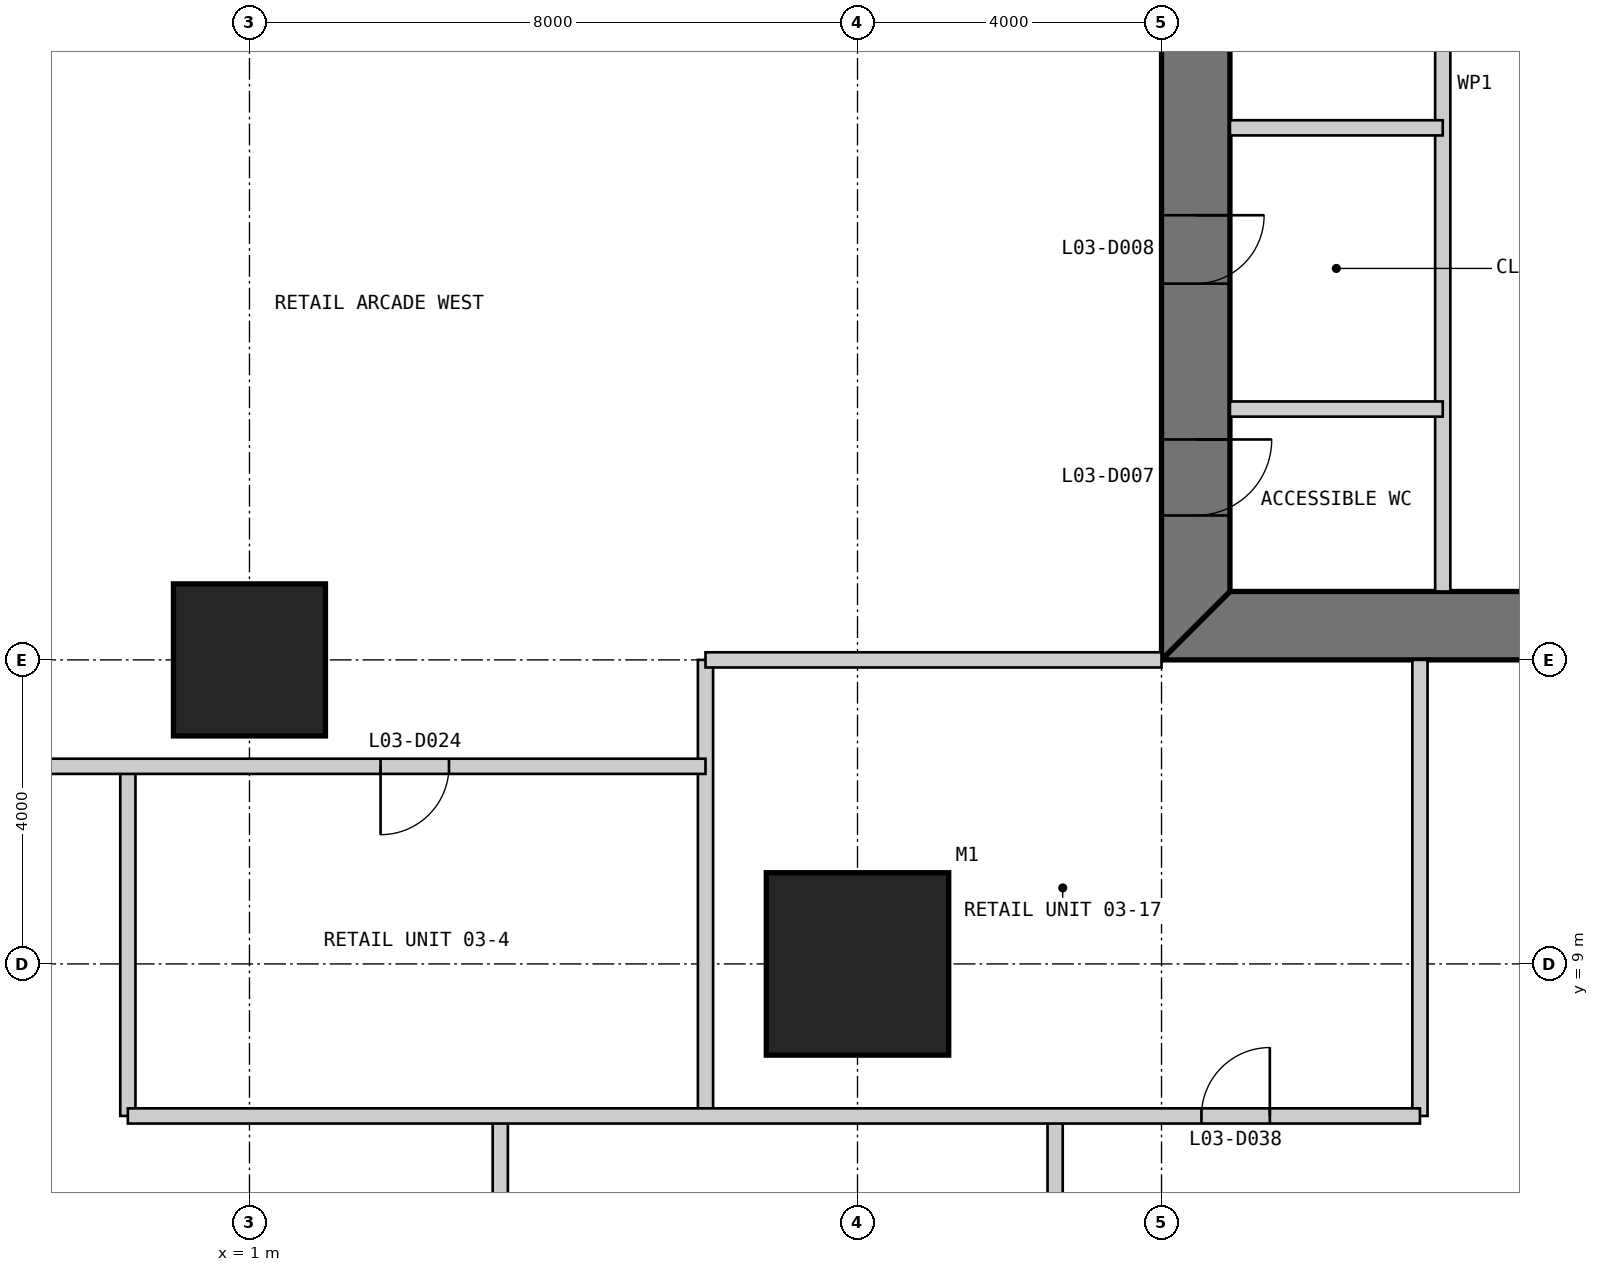
"""IFC4 building model, lengths in metres.
Left out: names, types, materials, properties, quantities, classifications, styles, units other than length and angle.
Written with IfcOpenShell. Run it as: python <this file> out.ifc"""

import sys

from ifc_helpers import new_model, si_unit, direction, frame, frame_2d, origin, origin_2d, place, context, subcontext, project, spatial, polyline, rectangle, outline, extrude, element, fill, save


model = new_model("IFC4")
c1 = context("Model", 3, precision=1e-05, world=origin(), true_north=direction((0.0, 1.0)))
c2 = subcontext(c1, "Body", "Model", "MODEL_VIEW")
j1 = project(units=[si_unit("LENGTHUNIT", "METRE"), si_unit("PLANEANGLEUNIT", "RADIAN")], contexts=[c1])
p1 = place(None, origin())
s1 = spatial("IfcSite", under=j1, at=p1, CompositionType="ELEMENT")
p2 = place(p1, origin())
s2 = spatial("IfcBuilding", under=s1, at=p2, CompositionType="ELEMENT")
p3 = place(p2, frame((0.0, 0.0, 16.6)))
s3 = spatial("IfcBuildingStorey", under=s2, at=p3, CompositionType="ELEMENT", Elevation=16.6)
p4 = place(p3, frame((9.0, 9.0, 0.0), z_axis=(0.0, 0.0, 1.0), x_axis=(1.0, 0.0, 0.0)))
e1 = element("IfcColumn", 1, at=p4, inside=s3, PredefinedType="COLUMN", context=c2, shape_type="SweptSolid", body=[
    extrude(rectangle(XDim=2.4, YDim=2.4, at=origin_2d()), origin(), (0.0, 0.0, 1.0), 4.8),
])
p5 = place(p3, frame((1.0, 13.0, 0.0), z_axis=(0.0, 0.0, 1.0), x_axis=(1.0, 0.0, 0.0)))
e2 = element("IfcColumn", 2, at=p5, inside=s3, PredefinedType="COLUMN", context=c2, shape_type="SweptSolid", body=[
    extrude(rectangle(XDim=2.0, YDim=2.0, at=origin_2d()), origin(), (0.0, 0.0, 1.0), 4.8),
])
p6 = place(p3, frame((13.0, 13.45, 0.0), z_axis=(0.0, 0.0, 1.0), x_axis=(1.0, 0.0, 0.0)))
e3 = element("IfcWall", 3, at=p6, inside=s3, PredefinedType="SHEAR", context=c2, shape_type="SweptSolid", body=[
    extrude(outline(polyline([(0.0, -0.45), (24.0, -0.45), (23.1, 0.45), (0.9, 0.45), (0.0, -0.45)])), origin(), (0.0, 0.0, 1.0), 4.8),
])
p7 = place(p6, frame((4.9, 0.0, 0.0)))
e4 = element("IfcOpeningElement", 4, at=p7, cuts=e3, PredefinedType="OPENING", context=c2, shape_type="SweptSolid", body=[
    extrude(rectangle(XDim=1.0, YDim=2.2, at=frame_2d((0.5, 1.1))), frame((0.0, 0.46, 0.0), z_axis=(0.0, -1.0, 0.0), x_axis=(1.0, 0.0, 0.0)), (0.0, 0.0, 1.0), 0.92),
])
p8 = place(p6, frame((8.9, 0.0, 0.0)))
e5 = element("IfcOpeningElement", 5, at=p8, cuts=e3, PredefinedType="OPENING", context=c2, shape_type="SweptSolid", body=[
    extrude(rectangle(XDim=1.1, YDim=2.2, at=frame_2d((0.55, 1.1))), frame((0.0, 0.46, 0.0), z_axis=(0.0, -1.0, 0.0), x_axis=(1.0, 0.0, 0.0)), (0.0, 0.0, 1.0), 0.92),
])
p9 = place(p6, frame((15.05, 0.0, 0.0)))
e6 = element("IfcOpeningElement", 6, at=p9, cuts=e3, PredefinedType="OPENING", context=c2, shape_type="SweptSolid", body=[
    extrude(rectangle(XDim=0.9, YDim=2.2, at=frame_2d((0.45, 1.1))), frame((0.0, 0.46, 0.0), z_axis=(0.0, -1.0, 0.0), x_axis=(1.0, 0.0, 0.0)), (0.0, 0.0, 1.0), 0.92),
])
p10 = place(p6, frame((17.9, 0.0, 0.0)))
e7 = element("IfcOpeningElement", 7, at=p10, cuts=e3, PredefinedType="OPENING", context=c2, shape_type="SweptSolid", body=[
    extrude(rectangle(XDim=1.0, YDim=2.2, at=frame_2d((0.5, 1.1))), frame((0.0, 0.46, 0.0), z_axis=(0.0, -1.0, 0.0), x_axis=(1.0, 0.0, 0.0)), (0.0, 0.0, 1.0), 0.92),
])
p11 = place(p6, frame((21.4, 0.0, 0.0)))
e8 = element("IfcOpeningElement", 8, at=p11, cuts=e3, PredefinedType="OPENING", context=c2, shape_type="SweptSolid", body=[
    extrude(rectangle(XDim=1.0, YDim=2.2, at=frame_2d((0.5, 1.1))), frame((0.0, 0.46, 0.0), z_axis=(0.0, -1.0, 0.0), x_axis=(1.0, 0.0, 0.0)), (0.0, 0.0, 1.0), 0.92),
])
p12 = place(p3, frame((13.45, 36.1, 0.0), z_axis=(0.0, 0.0, 1.0), x_axis=(0.0, -1.0, 0.0)))
e9 = element("IfcWall", 9, at=p12, inside=s3, PredefinedType="SHEAR", context=c2, shape_type="SweptSolid", body=[
    extrude(outline(polyline([(-0.9, -0.45), (23.1, -0.45), (22.2, 0.45), (0.0, 0.45), (-0.9, -0.45)])), origin(), (0.0, 0.0, 1.0), 4.8),
])
p13 = place(p12, frame((20.2, 0.0, 0.0)))
e10 = element("IfcOpeningElement", 10, at=p13, cuts=e9, PredefinedType="OPENING", context=c2, shape_type="SweptSolid", body=[
    extrude(rectangle(XDim=1.0, YDim=2.2, at=frame_2d((0.5, 1.1))), frame((0.0, 0.46, 0.0), z_axis=(0.0, -1.0, 0.0), x_axis=(1.0, 0.0, 0.0)), (0.0, 0.0, 1.0), 0.92),
])
p14 = place(p12, frame((17.25, 0.0, 0.0)))
e11 = element("IfcOpeningElement", 11, at=p14, cuts=e9, PredefinedType="OPENING", context=c2, shape_type="SweptSolid", body=[
    extrude(rectangle(XDim=0.9, YDim=2.2, at=frame_2d((0.45, 1.1))), frame((0.0, 0.46, 0.0), z_axis=(0.0, -1.0, 0.0), x_axis=(1.0, 0.0, 0.0)), (0.0, 0.0, 1.0), 0.92),
])
p15 = place(p3, frame((16.7, 13.9, 0.0), z_axis=(0.0, 0.0, 1.0), x_axis=(0.0, 1.0, 0.0)))
e12 = element("IfcWall", 12, at=p15, inside=s3, PredefinedType="PARTITIONING", context=c2, shape_type="SweptSolid", body=[
    extrude(rectangle(XDim=16.1, YDim=0.2, at=frame_2d((8.05, 0.0))), origin(), (0.0, 0.0, 1.0), 4.6),
])
for number, where, z_axis, x_axis in (
    (13, (13.9, 20.0, 0.0), (0.0, 0.0, 1.0), (1.0, 0.0, 0.0)),
    (14, (13.9, 16.3, 0.0), (0.0, 0.0, 1.0), (1.0, 0.0, 0.0)),
):
    element("IfcWall", number, at=place(p3, frame(where, z_axis=z_axis, x_axis=x_axis)), inside=s3, PredefinedType="PARTITIONING", context=c2, shape_type="SweptSolid", body=[
        extrude(rectangle(XDim=2.8, YDim=0.2, at=frame_2d((1.4, 0.0))), origin(), (0.0, 0.0, 1.0), 4.6),
    ])
p16 = place(p3, frame((-0.6, 7.0, 0.0), z_axis=(0.0, 0.0, 1.0), x_axis=(0.0, 1.0, 0.0)))
e15 = element("IfcWall", 15, at=p16, inside=s3, PredefinedType="PARTITIONING", context=c2, shape_type="SweptSolid", body=[
    extrude(rectangle(XDim=4.6, YDim=0.2, at=frame_2d((2.3, 0.0))), origin(), (0.0, 0.0, 1.0), 4.5),
])
p17 = place(p3, frame((4.3, 4.9, 0.0), z_axis=(0.0, 0.0, 1.0), x_axis=(0.0, 1.0, 0.0)))
e16 = element("IfcWall", 16, at=p17, inside=s3, PredefinedType="PARTITIONING", context=c2, shape_type="SweptSolid", body=[
    extrude(rectangle(XDim=2.1, YDim=0.2, at=frame_2d((1.05, 0.0))), origin(), (0.0, 0.0, 1.0), 4.5),
])
p18 = place(p3, frame((7.0, 7.0, 0.0), z_axis=(0.0, 0.0, 1.0), x_axis=(0.0, 1.0, 0.0)))
e17 = element("IfcWall", 17, at=p18, inside=s3, PredefinedType="PARTITIONING", context=c2, shape_type="SweptSolid", body=[
    extrude(rectangle(XDim=6.0, YDim=0.2, at=frame_2d((3.0, 0.0))), origin(), (0.0, 0.0, 1.0), 4.5),
])
p19 = place(p3, frame((11.6, -7.25, 0.0), z_axis=(0.0, 0.0, 1.0), x_axis=(0.0, 1.0, 0.0)))
e18 = element("IfcWall", 18, at=p19, inside=s3, PredefinedType="PARTITIONING", context=c2, shape_type="SweptSolid", body=[
    extrude(rectangle(XDim=14.25, YDim=0.2, at=frame_2d((7.125, 0.0))), origin(), (0.0, 0.0, 1.0), 4.5),
])
p20 = place(p19, frame((5.225, 0.0, 0.0)))
e19 = element("IfcOpeningElement", 19, at=p20, cuts=e18, PredefinedType="OPENING", context=c2, shape_type="SweptSolid", body=[
    extrude(rectangle(XDim=1.8, YDim=2.4, at=frame_2d((0.9, 1.2))), frame((0.0, 0.11, 0.0), z_axis=(0.0, -1.0, 0.0), x_axis=(1.0, 0.0, 0.0)), (0.0, 0.0, 1.0), 0.22),
])
p21 = place(p3, frame((16.4, 7.0, 0.0), z_axis=(0.0, 0.0, 1.0), x_axis=(0.0, 1.0, 0.0)))
e20 = element("IfcWall", 20, at=p21, inside=s3, PredefinedType="PARTITIONING", context=c2, shape_type="SweptSolid", body=[
    extrude(rectangle(XDim=6.0, YDim=0.2, at=frame_2d((3.0, 0.0))), origin(), (0.0, 0.0, 1.0), 4.5),
])
p22 = place(p3, frame((-0.6, 7.0, 0.0), z_axis=(0.0, 0.0, 1.0), x_axis=(1.0, 0.0, 0.0)))
e21 = element("IfcWall", 21, at=p22, inside=s3, PredefinedType="PARTITIONING", context=c2, shape_type="SweptSolid", body=[
    extrude(rectangle(XDim=17.0, YDim=0.2, at=frame_2d((8.5, 0.0))), origin(), (0.0, 0.0, 1.0), 4.5),
])
p23 = place(p22, frame((14.125, 0.0, 0.0)))
e22 = element("IfcOpeningElement", 22, at=p23, cuts=e21, PredefinedType="OPENING", context=c2, shape_type="SweptSolid", body=[
    extrude(rectangle(XDim=0.9, YDim=2.2, at=frame_2d((0.45, 1.1))), frame((0.0, 0.11, 0.0), z_axis=(0.0, -1.0, 0.0), x_axis=(1.0, 0.0, 0.0)), (0.0, 0.0, 1.0), 0.22),
])
p24 = place(p3, frame((-15.25, 11.6, 0.0), z_axis=(0.0, 0.0, 1.0), x_axis=(1.0, 0.0, 0.0)))
e23 = element("IfcWall", 23, at=p24, inside=s3, PredefinedType="PARTITIONING", context=c2, shape_type="SweptSolid", body=[
    extrude(rectangle(XDim=22.25, YDim=0.2, at=frame_2d((11.125, 0.0))), origin(), (0.0, 0.0, 1.0), 4.5),
])
p25 = place(p24, frame((10.325, 0.0, 0.0)))
e24 = element("IfcOpeningElement", 24, at=p25, cuts=e23, PredefinedType="OPENING", context=c2, shape_type="SweptSolid", body=[
    extrude(rectangle(XDim=1.8, YDim=2.4, at=frame_2d((0.9, 1.2))), frame((0.0, 0.11, 0.0), z_axis=(0.0, -1.0, 0.0), x_axis=(1.0, 0.0, 0.0)), (0.0, 0.0, 1.0), 0.22),
])
p26 = place(p24, frame((3.025, 0.0, 0.0)))
e25 = element("IfcOpeningElement", 25, at=p26, cuts=e23, PredefinedType="OPENING", context=c2, shape_type="SweptSolid", body=[
    extrude(rectangle(XDim=1.8, YDim=2.4, at=frame_2d((0.9, 1.2))), frame((0.0, 0.11, 0.0), z_axis=(0.0, -1.0, 0.0), x_axis=(1.0, 0.0, 0.0)), (0.0, 0.0, 1.0), 0.22),
])
p27 = place(p24, frame((17.975, 0.0, 0.0)))
e26 = element("IfcOpeningElement", 26, at=p27, cuts=e23, PredefinedType="OPENING", context=c2, shape_type="SweptSolid", body=[
    extrude(rectangle(XDim=0.9, YDim=2.2, at=frame_2d((0.45, 1.1))), frame((0.0, 0.11, 0.0), z_axis=(0.0, -1.0, 0.0), x_axis=(1.0, 0.0, 0.0)), (0.0, 0.0, 1.0), 0.22),
])
p28 = place(p3, frame((7.0, 13.0, 0.0), z_axis=(0.0, 0.0, 1.0), x_axis=(1.0, 0.0, 0.0)))
e27 = element("IfcWall", 27, at=p28, inside=s3, PredefinedType="PARTITIONING", context=c2, shape_type="SweptSolid", body=[
    extrude(rectangle(XDim=6.0, YDim=0.2, at=frame_2d((3.0, 0.0))), origin(), (0.0, 0.0, 1.0), 3.653),
])
p29 = place(p13, origin())
e28 = element("IfcDoor", 28, at=p29, inside=s3, OperationType="SINGLE_SWING_LEFT", PredefinedType="DOOR", context=c2, shape_type="SweptSolid", body=[
    extrude(rectangle(XDim=1.0, YDim=2.2, at=frame_2d((0.5, 1.1))), frame((0.0, 0.025, 0.0), z_axis=(0.0, -1.0, 0.0), x_axis=(1.0, 0.0, 0.0)), (0.0, 0.0, 1.0), 0.05),
    extrude(outline(polyline([(0.0, 0.0), (0.04, 0.0), (0.04, 2.16), (0.96, 2.16), (0.96, 0.0), (1.0, 0.0), (1.0, 2.2), (0.0, 2.2), (0.0, 0.0)])), frame((0.0, 0.3, 0.0), z_axis=(0.0, -1.0, 0.0), x_axis=(1.0, 0.0, 0.0)), (0.0, 0.0, 1.0), 0.6),
])
fill(e10, e28)
p30 = place(p14, origin())
e29 = element("IfcDoor", 29, at=p30, inside=s3, OperationType="SINGLE_SWING_LEFT", PredefinedType="DOOR", context=c2, shape_type="SweptSolid", body=[
    extrude(rectangle(XDim=0.9, YDim=2.2, at=frame_2d((0.45, 1.1))), frame((0.0, 0.025, 0.0), z_axis=(0.0, -1.0, 0.0), x_axis=(1.0, 0.0, 0.0)), (0.0, 0.0, 1.0), 0.05),
    extrude(outline(polyline([(0.0, 0.0), (0.04, 0.0), (0.04, 2.16), (0.86, 2.16), (0.86, 0.0), (0.9, 0.0), (0.9, 2.2), (0.0, 2.2), (0.0, 0.0)])), frame((0.0, 0.3, 0.0), z_axis=(0.0, -1.0, 0.0), x_axis=(1.0, 0.0, 0.0)), (0.0, 0.0, 1.0), 0.6),
])
fill(e11, e29)
p31 = place(p27, frame((0.9, 0.0, 0.0), z_axis=(0.0, 0.0, 1.0), x_axis=(-1.0, 0.0, 0.0)))
e30 = element("IfcDoor", 30, at=p31, inside=s3, OperationType="SINGLE_SWING_RIGHT", PredefinedType="DOOR", context=c2, shape_type="SweptSolid", body=[
    extrude(rectangle(XDim=0.9, YDim=2.2, at=frame_2d((0.45, 1.1))), frame((0.0, 0.025, 0.0), z_axis=(0.0, -1.0, 0.0), x_axis=(1.0, 0.0, 0.0)), (0.0, 0.0, 1.0), 0.05),
])
fill(e26, e30)
p32 = place(p23, origin())
e31 = element("IfcDoor", 31, at=p32, inside=s3, OperationType="SINGLE_SWING_RIGHT", PredefinedType="DOOR", context=c2, shape_type="SweptSolid", body=[
    extrude(rectangle(XDim=0.9, YDim=2.2, at=frame_2d((0.45, 1.1))), frame((0.0, 0.025, 0.0), z_axis=(0.0, -1.0, 0.0), x_axis=(1.0, 0.0, 0.0)), (0.0, 0.0, 1.0), 0.05),
])
fill(e22, e31)
save(model, sys.argv[1])
